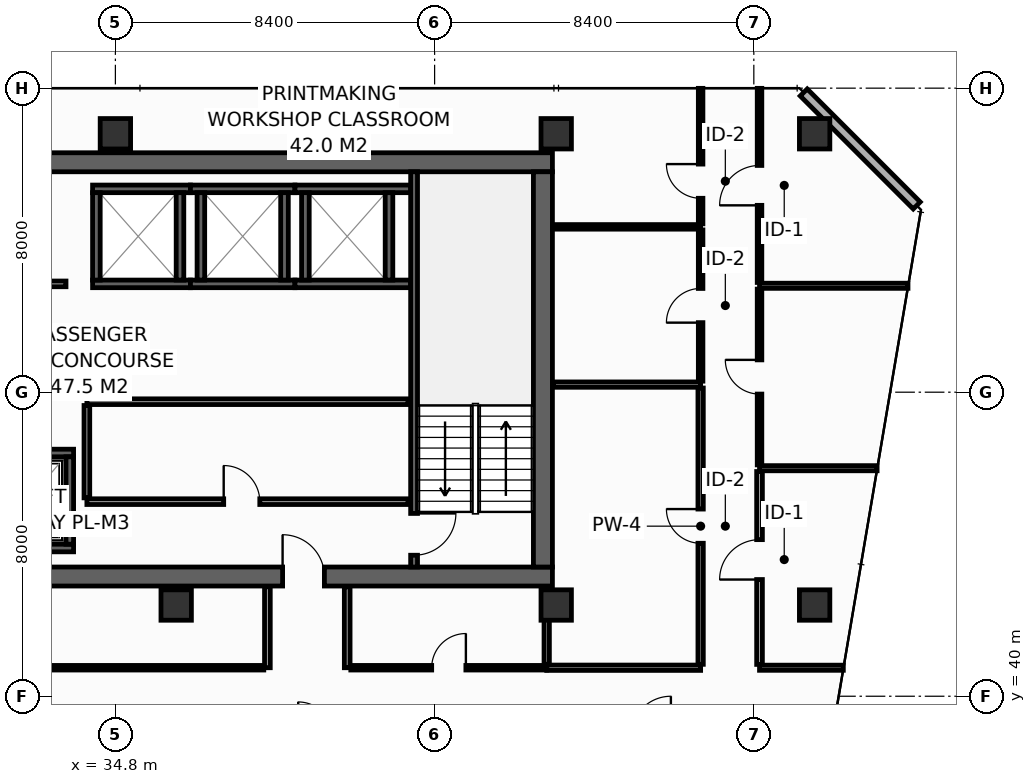
"""IFC4 building model, lengths in metres.
Left out: names, types, materials, properties, quantities, classifications, styles, units other than length and angle.
Written with IfcOpenShell. Run it as: python <this file> out.ifc"""

import sys

from ifc_helpers import new_model, si_unit, direction, frame, frame_2d, origin, origin_2d, place, context, subcontext, project, spatial, rectangle, hollow_rectangle, extrude, element, fill, save


model = new_model("IFC4")
c1 = context("Model", 3, precision=1e-05, world=origin(), true_north=direction((0.0, 1.0)))
c2 = subcontext(c1, "Body", "Model", "MODEL_VIEW")
j1 = project(units=[si_unit("LENGTHUNIT", "METRE"), si_unit("PLANEANGLEUNIT", "RADIAN")], contexts=[c1])
p1 = place(None, origin())
s1 = spatial("IfcSite", under=j1, at=p1, CompositionType="ELEMENT")
p2 = place(p1, origin())
s2 = spatial("IfcBuilding", under=s1, at=p2, CompositionType="ELEMENT")
p3 = place(p2, frame((0.0, 0.0, 213.2)))
s3 = spatial("IfcBuildingStorey", under=s2, at=p3, CompositionType="ELEMENT", Elevation=213.2)
p4 = place(p3, frame((13.6, 43.15, 0.0), z_axis=(0.0, 0.0, 1.0), x_axis=(1.0, 0.0, 0.0)))
e1 = element("IfcWall", 1, at=p4, inside=s3, PredefinedType="SHEAR", context=c2, shape_type="SweptSolid", body=[
    extrude(rectangle(XDim=32.7, YDim=0.5, at=frame_2d((16.35, 0.0))), origin(), (0.0, 0.0, 1.0), 3.55),
])
p5 = place(p4, frame((5.4, 0.0, 0.0)))
e2 = element("IfcOpeningElement", 2, at=p5, cuts=e1, PredefinedType="OPENING", context=c2, shape_type="SweptSolid", body=[
    extrude(rectangle(XDim=1.1, YDim=2.15, at=frame_2d((0.55, 1.075))), frame((0.0, 0.26, 0.0), z_axis=(0.0, -1.0, 0.0), x_axis=(1.0, 0.0, 0.0)), (0.0, 0.0, 1.0), 0.52),
])
p6 = place(p4, frame((25.6, 0.0, 0.0)))
e3 = element("IfcOpeningElement", 3, at=p6, cuts=e1, PredefinedType="OPENING", context=c2, shape_type="SweptSolid", body=[
    extrude(rectangle(XDim=1.1, YDim=2.15, at=frame_2d((0.55, 1.075))), frame((0.0, 0.26, 0.0), z_axis=(0.0, -1.0, 0.0), x_axis=(1.0, 0.0, 0.0)), (0.0, 0.0, 1.0), 0.52),
])
p7 = place(p3, frame((13.6, 54.05, 0.0), z_axis=(0.0, 0.0, 1.0), x_axis=(1.0, 0.0, 0.0)))
e4 = element("IfcWall", 4, at=p7, inside=s3, PredefinedType="SHEAR", context=c2, shape_type="SweptSolid", body=[
    extrude(rectangle(XDim=32.7, YDim=0.5, at=frame_2d((16.35, 0.0))), origin(), (0.0, 0.0, 1.0), 3.55),
])
p8 = place(p3, frame((46.05, 43.4, 0.0), z_axis=(0.0, 0.0, 1.0), x_axis=(0.0, 1.0, 0.0)))
e5 = element("IfcWall", 5, at=p8, inside=s3, PredefinedType="SHEAR", context=c2, shape_type="SweptSolid", body=[
    extrude(rectangle(XDim=10.4, YDim=0.5, at=frame_2d((5.2, 0.0))), origin(), (0.0, 0.0, 1.0), 3.55),
])
for number, where, z_axis, x_axis in (
    (6, (34.8, 54.8, 0.0), (0.0, 0.0, 1.0), (1.0, 0.0, 0.0)),
    (7, (46.4, 54.8, 0.0), (0.0, 0.0, 1.0), (1.0, 0.0, 0.0)),
    (8, (53.2, 54.8, 0.0), (0.0, 0.0, 1.0), (1.0, 0.0, 0.0)),
    (9, (36.4, 42.4, 0.0), (0.0, 0.0, 1.0), (1.0, 0.0, 0.0)),
    (10, (46.4, 42.4, 0.0), (0.0, 0.0, 1.0), (1.0, 0.0, 0.0)),
    (11, (53.2, 42.4, 0.0), (0.0, 0.0, 1.0), (1.0, 0.0, 0.0)),
):
    element("IfcColumn", number, at=place(p3, frame(where, z_axis=z_axis, x_axis=x_axis)), inside=s3, PredefinedType="COLUMN", context=c2, shape_type="SweptSolid", body=[
        extrude(hollow_rectangle(XDim=0.8, YDim=0.8, WallThickness=0.036, at=origin_2d()), origin(), (0.0, 0.0, 1.0), 3.8),
    ])
p9 = place(p3, frame((31.125, 43.9, 0.0), z_axis=(0.0, 0.0, 1.0), x_axis=(1.0, 0.0, 0.0)))
e12 = element("IfcWall", 12, at=p9, inside=s3, PredefinedType="SHEAR", context=c2, shape_type="SweptSolid", body=[
    extrude(rectangle(XDim=2.575, YDim=0.2, at=frame_2d((1.288, 0.0))), origin(), (0.0, 0.0, 1.0), 3.55),
])
p10 = place(p3, frame((31.125, 46.4, 0.0), z_axis=(0.0, 0.0, 1.0), x_axis=(1.0, 0.0, 0.0)))
e13 = element("IfcWall", 13, at=p10, inside=s3, PredefinedType="SHEAR", context=c2, shape_type="SweptSolid", body=[
    extrude(rectangle(XDim=2.575, YDim=0.2, at=frame_2d((1.288, 0.0))), origin(), (0.0, 0.0, 1.0), 3.55),
])
p11 = place(p10, frame((0.825, 0.0, 0.0)))
e14 = element("IfcOpeningElement", 14, at=p11, cuts=e13, PredefinedType="OPENING", context=c2, shape_type="SweptSolid", body=[
    extrude(rectangle(XDim=1.1, YDim=2.2, at=frame_2d((0.55, 1.1))), frame((0.0, 0.11, 0.0), z_axis=(0.0, -1.0, 0.0), x_axis=(1.0, 0.0, 0.0)), (0.0, 0.0, 1.0), 0.22),
])
p12 = place(p3, frame((33.6, 44.0, 0.0), z_axis=(0.0, 0.0, 1.0), x_axis=(0.0, 1.0, 0.0)))
e15 = element("IfcWall", 15, at=p12, inside=s3, PredefinedType="SHEAR", context=c2, shape_type="SweptSolid", body=[
    extrude(rectangle(XDim=2.3, YDim=0.2, at=frame_2d((1.15, 0.0))), origin(), (0.0, 0.0, 1.0), 3.55),
])
for number, where, z_axis, x_axis in (
    (16, (34.2, 50.85, 0.0), (0.0, 0.0, 1.0), (1.0, 0.0, 0.0)),
    (17, (34.2, 53.35, 0.0), (0.0, 0.0, 1.0), (1.0, 0.0, 0.0)),
):
    element("IfcWall", number, at=place(p3, frame(where, z_axis=z_axis, x_axis=x_axis)), inside=s3, PredefinedType="SHEAR", context=c2, shape_type="SweptSolid", body=[
        extrude(rectangle(XDim=2.575, YDim=0.2, at=frame_2d((1.288, 0.0))), origin(), (0.0, 0.0, 1.0), 3.55),
    ])
for number, where, z_axis, x_axis in (
    (18, (34.3, 50.95, 0.0), (0.0, 0.0, 1.0), (0.0, 1.0, 0.0)),
    (19, (36.5, 50.95, 0.0), (0.0, 0.0, 1.0), (0.0, 1.0, 0.0)),
):
    element("IfcWall", number, at=place(p3, frame(where, z_axis=z_axis, x_axis=x_axis)), inside=s3, PredefinedType="SHEAR", context=c2, shape_type="SweptSolid", body=[
        extrude(rectangle(XDim=2.3, YDim=0.2, at=frame_2d((1.15, 0.0))), origin(), (0.0, 0.0, 1.0), 3.55),
    ])
for number, where, z_axis, x_axis in (
    (20, (36.775, 50.85, 0.0), (0.0, 0.0, 1.0), (1.0, 0.0, 0.0)),
    (21, (36.775, 53.35, 0.0), (0.0, 0.0, 1.0), (1.0, 0.0, 0.0)),
):
    element("IfcWall", number, at=place(p3, frame(where, z_axis=z_axis, x_axis=x_axis)), inside=s3, PredefinedType="SHEAR", context=c2, shape_type="SweptSolid", body=[
        extrude(rectangle(XDim=2.75, YDim=0.2, at=frame_2d((1.375, 0.0))), origin(), (0.0, 0.0, 1.0), 3.55),
    ])
for number, where, z_axis, x_axis in (
    (22, (37.05, 50.95, 0.0), (0.0, 0.0, 1.0), (0.0, 1.0, 0.0)),
    (23, (39.25, 50.95, 0.0), (0.0, 0.0, 1.0), (0.0, 1.0, 0.0)),
):
    element("IfcWall", number, at=place(p3, frame(where, z_axis=z_axis, x_axis=x_axis)), inside=s3, PredefinedType="SHEAR", context=c2, shape_type="SweptSolid", body=[
        extrude(rectangle(XDim=2.3, YDim=0.2, at=frame_2d((1.15, 0.0))), origin(), (0.0, 0.0, 1.0), 3.55),
    ])
for number, where, z_axis, x_axis in (
    (24, (39.525, 50.85, 0.0), (0.0, 0.0, 1.0), (1.0, 0.0, 0.0)),
    (25, (39.525, 53.35, 0.0), (0.0, 0.0, 1.0), (1.0, 0.0, 0.0)),
):
    element("IfcWall", number, at=place(p3, frame(where, z_axis=z_axis, x_axis=x_axis)), inside=s3, PredefinedType="SHEAR", context=c2, shape_type="SweptSolid", body=[
        extrude(rectangle(XDim=3.045, YDim=0.2, at=frame_2d((1.522, 0.0))), origin(), (0.0, 0.0, 1.0), 3.55),
    ])
for number, where, z_axis, x_axis in (
    (26, (39.8, 50.95, 0.0), (0.0, 0.0, 1.0), (0.0, 1.0, 0.0)),
    (27, (42.0, 50.95, 0.0), (0.0, 0.0, 1.0), (0.0, 1.0, 0.0)),
):
    element("IfcWall", number, at=place(p3, frame(where, z_axis=z_axis, x_axis=x_axis)), inside=s3, PredefinedType="SHEAR", context=c2, shape_type="SweptSolid", body=[
        extrude(rectangle(XDim=2.3, YDim=0.2, at=frame_2d((1.15, 0.0))), origin(), (0.0, 0.0, 1.0), 3.55),
    ])
p13 = place(p3, frame((42.66, 53.8, 0.0), z_axis=(0.0, 0.0, 1.0), x_axis=(0.0, -1.0, 0.0)))
e28 = element("IfcWall", 28, at=p13, inside=s3, PredefinedType="SHEAR", context=c2, shape_type="SweptSolid", body=[
    extrude(rectangle(XDim=10.4, YDim=0.18, at=frame_2d((5.2, 0.0))), origin(), (0.0, 0.0, 1.0), 3.55),
])
p14 = place(p13, frame((8.99, 0.0, 0.0)))
e29 = element("IfcOpeningElement", 29, at=p14, cuts=e28, PredefinedType="OPENING", context=c2, shape_type="SweptSolid", body=[
    extrude(rectangle(XDim=1.1, YDim=2.15, at=frame_2d((0.55, 1.075))), frame((0.0, 0.1, 0.0), z_axis=(0.0, -1.0, 0.0), x_axis=(1.0, 0.0, 0.0)), (0.0, 0.0, 1.0), 0.2),
])
p15 = place(p3, frame((34.05, 45.12, 0.0), z_axis=(0.0, 0.0, 1.0), x_axis=(1.0, 0.0, 0.0)))
e30 = element("IfcWall", 30, at=p15, inside=s3, PredefinedType="PARTITIONING", context=c2, shape_type="SweptSolid", body=[
    extrude(rectangle(XDim=8.45, YDim=0.15, at=frame_2d((4.225, 0.0))), origin(), (0.0, 0.0, 1.0), 3.55),
])
p16 = place(p15, frame((3.6, 0.0, 0.0)))
e31 = element("IfcOpeningElement", 31, at=p16, cuts=e30, PredefinedType="OPENING", context=c2, shape_type="SweptSolid", body=[
    extrude(rectangle(XDim=0.95, YDim=2.15, at=frame_2d((0.475, 1.075))), frame((0.0, 0.085, 0.0), z_axis=(0.0, -1.0, 0.0), x_axis=(1.0, 0.0, 0.0)), (0.0, 0.0, 1.0), 0.17),
])
p17 = place(p3, frame((34.05, 47.75, 0.0), z_axis=(0.0, 0.0, 1.0), x_axis=(1.0, 0.0, 0.0)))
e32 = element("IfcWall", 32, at=p17, inside=s3, PredefinedType="PARTITIONING", context=c2, shape_type="SweptSolid", body=[
    extrude(rectangle(XDim=8.45, YDim=0.15, at=frame_2d((4.225, 0.0))), origin(), (0.0, 0.0, 1.0), 3.55),
])
p18 = place(p3, frame((34.05, 45.22, 0.0), z_axis=(0.0, 0.0, 1.0), x_axis=(0.0, 1.0, 0.0)))
e33 = element("IfcWall", 33, at=p18, inside=s3, PredefinedType="PARTITIONING", context=c2, shape_type="SweptSolid", body=[
    extrude(rectangle(XDim=2.43, YDim=0.15, at=frame_2d((1.215, 0.0))), origin(), (0.0, 0.0, 1.0), 3.55),
])
p19 = place(p3, frame((25.85, 50.85, 0.0), z_axis=(0.0, 0.0, 1.0), x_axis=(1.0, 0.0, 0.0)))
e34 = element("IfcWall", 34, at=p19, inside=s3, PredefinedType="PARTITIONING", context=c2, shape_type="SweptSolid", body=[
    extrude(rectangle(XDim=7.65, YDim=0.15, at=frame_2d((3.825, 0.0))), origin(), (0.0, 0.0, 1.0), 3.55),
])
p20 = place(p19, frame((1.25, 0.0, 0.0)))
e35 = element("IfcOpeningElement", 35, at=p20, cuts=e34, PredefinedType="OPENING", context=c2, shape_type="SweptSolid", body=[
    extrude(rectangle(XDim=0.95, YDim=2.15, at=frame_2d((0.475, 1.075))), frame((0.0, 0.085, 0.0), z_axis=(0.0, -1.0, 0.0), x_axis=(1.0, 0.0, 0.0)), (0.0, 0.0, 1.0), 0.17),
])
p21 = place(p19, frame((5.05, 0.0, 0.0)))
e36 = element("IfcOpeningElement", 36, at=p21, cuts=e34, PredefinedType="OPENING", context=c2, shape_type="SweptSolid", body=[
    extrude(rectangle(XDim=0.95, YDim=2.15, at=frame_2d((0.475, 1.075))), frame((0.0, 0.085, 0.0), z_axis=(0.0, -1.0, 0.0), x_axis=(1.0, 0.0, 0.0)), (0.0, 0.0, 1.0), 0.17),
])
p22 = place(p3, frame((55.887, 52.913, 0.0), z_axis=(0.0, 0.0, 1.0), x_axis=(-0.707106781187, 0.707106781187, 0.0)))
e37 = element("IfcWall", 37, at=p22, inside=s3, PredefinedType="STANDARD", context=c2, shape_type="SweptSolid", body=[
    extrude(rectangle(XDim=4.206, YDim=0.26, at=frame_2d((2.103, 0.0))), origin(), (0.0, 0.0, 1.0), 3.55),
])
p23 = place(p3, frame((46.15, 40.75, 0.0), z_axis=(0.0, 0.0, 1.0), x_axis=(1.0, 0.0, 0.0)))
e38 = element("IfcWall", 38, at=p23, inside=s3, PredefinedType="PARTITIONING", context=c2, shape_type="SweptSolid", body=[
    extrude(rectangle(XDim=4.05, YDim=0.14, at=frame_2d((2.025, 0.0))), origin(), (0.0, 0.0, 1.0), 3.55),
])
p24 = place(p3, frame((46.15, 40.84, 0.0), z_axis=(0.0, 0.0, 1.0), x_axis=(0.0, 1.0, 0.0)))
e39 = element("IfcWall", 39, at=p24, inside=s3, PredefinedType="PARTITIONING", context=c2, shape_type="SweptSolid", body=[
    extrude(rectangle(XDim=2.04, YDim=0.14, at=frame_2d((1.02, 0.0))), origin(), (0.0, 0.0, 1.0), 3.55),
])
p25 = place(p3, frame((46.32, 48.2, 0.0), z_axis=(0.0, 0.0, 1.0), x_axis=(1.0, 0.0, 0.0)))
e40 = element("IfcWall", 40, at=p25, inside=s3, PredefinedType="PARTITIONING", context=c2, shape_type="SweptSolid", body=[
    extrude(rectangle(XDim=3.88, YDim=0.14, at=frame_2d((1.94, 0.0))), origin(), (0.0, 0.0, 1.0), 3.55),
])
p26 = place(p3, frame((50.2, 40.84, 0.0), z_axis=(0.0, 0.0, 1.0), x_axis=(0.0, 1.0, 0.0)))
e41 = element("IfcWall", 41, at=p26, inside=s3, PredefinedType="PARTITIONING", context=c2, shape_type="SweptSolid", body=[
    extrude(rectangle(XDim=7.27, YDim=0.14, at=frame_2d((3.635, 0.0))), origin(), (0.0, 0.0, 1.0), 2.835),
])
p27 = place(p26, frame((3.185, 0.0, 0.0)))
e42 = element("IfcOpeningElement", 42, at=p27, cuts=e41, PredefinedType="OPENING", context=c2, shape_type="SweptSolid", body=[
    extrude(rectangle(XDim=0.9, YDim=2.1, at=frame_2d((0.45, 1.05))), frame((0.0, 0.08, 0.0), z_axis=(0.0, -1.0, 0.0), x_axis=(1.0, 0.0, 0.0)), (0.0, 0.0, 1.0), 0.16),
])
p28 = place(p3, frame((46.32, 52.35, 0.0), z_axis=(0.0, 0.0, 1.0), x_axis=(1.0, 0.0, 0.0)))
e43 = element("IfcWall", 43, at=p28, inside=s3, PredefinedType="PARTITIONING", context=c2, shape_type="SweptSolid", body=[
    extrude(rectangle(XDim=3.88, YDim=0.12, at=frame_2d((1.94, 0.0))), origin(), (0.0, 0.0, 1.0), 3.55),
])
p29 = place(p3, frame((50.2, 48.29, 0.0), z_axis=(0.0, 0.0, 1.0), x_axis=(0.0, 1.0, 0.0)))
e44 = element("IfcWall", 44, at=p29, inside=s3, PredefinedType="PARTITIONING", context=c2, shape_type="SweptSolid", body=[
    extrude(rectangle(XDim=3.98, YDim=0.12, at=frame_2d((1.99, 0.0))), origin(), (0.0, 0.0, 1.0), 3.55),
])
p30 = place(p29, frame((1.54, 0.0, 0.0)))
e45 = element("IfcOpeningElement", 45, at=p30, cuts=e44, PredefinedType="OPENING", context=c2, shape_type="SweptSolid", body=[
    extrude(rectangle(XDim=0.9, YDim=2.1, at=frame_2d((0.45, 1.05))), frame((0.0, 0.07, 0.0), z_axis=(0.0, -1.0, 0.0), x_axis=(1.0, 0.0, 0.0)), (0.0, 0.0, 1.0), 0.14),
])
p31 = place(p3, frame((50.2, 52.43, 0.0), z_axis=(0.0, 0.0, 1.0), x_axis=(0.0, 1.0, 0.0)))
e46 = element("IfcWall", 46, at=p31, inside=s3, PredefinedType="PARTITIONING", context=c2, shape_type="SweptSolid", body=[
    extrude(rectangle(XDim=3.565, YDim=0.12, at=frame_2d((1.783, 0.0))), origin(), (0.0, 0.0, 1.0), 2.935),
])
p32 = place(p31, frame((0.672, 0.0, 0.0)))
e47 = element("IfcOpeningElement", 47, at=p32, cuts=e46, PredefinedType="OPENING", context=c2, shape_type="SweptSolid", body=[
    extrude(rectangle(XDim=0.9, YDim=2.1, at=frame_2d((0.45, 1.05))), frame((0.0, 0.07, 0.0), z_axis=(0.0, -1.0, 0.0), x_axis=(1.0, 0.0, 0.0)), (0.0, 0.0, 1.0), 0.14),
])
p33 = place(p3, frame((51.75, 40.75, 0.0), z_axis=(0.0, 0.0, 1.0), x_axis=(1.0, 0.0, 0.0)))
e48 = element("IfcWall", 48, at=p33, inside=s3, PredefinedType="PARTITIONING", context=c2, shape_type="SweptSolid", body=[
    extrude(rectangle(XDim=2.205, YDim=0.135, at=frame_2d((1.103, 0.0))), origin(), (0.0, 0.0, 1.0), 3.035),
])
p34 = place(p3, frame((51.75, 46.0, 0.0), z_axis=(0.0, 0.0, 1.0), x_axis=(1.0, 0.0, 0.0)))
e49 = element("IfcWall", 49, at=p34, inside=s3, PredefinedType="PARTITIONING", context=c2, shape_type="SweptSolid", body=[
    extrude(rectangle(XDim=3.094, YDim=0.135, at=frame_2d((1.547, 0.0))), origin(), (0.0, 0.0, 1.0), 2.835),
])
p35 = place(p3, frame((51.75, 50.8, 0.0), z_axis=(0.0, 0.0, 1.0), x_axis=(1.0, 0.0, 0.0)))
e50 = element("IfcWall", 50, at=p35, inside=s3, PredefinedType="PARTITIONING", context=c2, shape_type="SweptSolid", body=[
    extrude(rectangle(XDim=3.906, YDim=0.135, at=frame_2d((1.953, 0.0))), origin(), (0.0, 0.0, 1.0), 2.835),
])
p36 = place(p3, frame((51.75, 40.837, 0.0), z_axis=(0.0, 0.0, 1.0), x_axis=(0.0, 1.0, 0.0)))
e51 = element("IfcWall", 51, at=p36, inside=s3, PredefinedType="PARTITIONING", context=c2, shape_type="SweptSolid", body=[
    extrude(rectangle(XDim=5.075, YDim=0.15, at=frame_2d((2.538, 0.0))), origin(), (0.0, 0.0, 1.0), 2.835),
])
p37 = place(p36, frame((2.233, 0.0, 0.0)))
e52 = element("IfcOpeningElement", 52, at=p37, cuts=e51, PredefinedType="OPENING", context=c2, shape_type="SweptSolid", body=[
    extrude(rectangle(XDim=1.05, YDim=2.15, at=frame_2d((0.525, 1.075))), frame((0.0, 0.085, 0.0), z_axis=(0.0, -1.0, 0.0), x_axis=(1.0, 0.0, 0.0)), (0.0, 0.0, 1.0), 0.17),
])
p38 = place(p3, frame((51.75, 46.087, 0.0), z_axis=(0.0, 0.0, 1.0), x_axis=(0.0, 1.0, 0.0)))
e53 = element("IfcWall", 53, at=p38, inside=s3, PredefinedType="PARTITIONING", context=c2, shape_type="SweptSolid", body=[
    extrude(rectangle(XDim=4.625, YDim=0.12, at=frame_2d((2.312, 0.0))), origin(), (0.0, 0.0, 1.0), 3.55),
])
p39 = place(p38, frame((1.863, 0.0, 0.0)))
e54 = element("IfcOpeningElement", 54, at=p39, cuts=e53, PredefinedType="OPENING", context=c2, shape_type="SweptSolid", body=[
    extrude(rectangle(XDim=0.9, YDim=2.1, at=frame_2d((0.45, 1.05))), frame((0.0, 0.07, 0.0), z_axis=(0.0, -1.0, 0.0), x_axis=(1.0, 0.0, 0.0)), (0.0, 0.0, 1.0), 0.14),
])
p40 = place(p3, frame((51.75, 50.887, 0.0), z_axis=(0.0, 0.0, 1.0), x_axis=(0.0, 1.0, 0.0)))
e55 = element("IfcWall", 55, at=p40, inside=s3, PredefinedType="PARTITIONING", context=c2, shape_type="SweptSolid", body=[
    extrude(rectangle(XDim=5.108, YDim=0.12, at=frame_2d((2.554, 0.0))), origin(), (0.0, 0.0, 1.0), 2.935),
])
p41 = place(p40, frame((2.029, 0.0, 0.0)))
e56 = element("IfcOpeningElement", 56, at=p41, cuts=e55, PredefinedType="OPENING", context=c2, shape_type="SweptSolid", body=[
    extrude(rectangle(XDim=1.05, YDim=2.15, at=frame_2d((0.525, 1.075))), frame((0.0, 0.07, 0.0), z_axis=(0.0, -1.0, 0.0), x_axis=(1.0, 0.0, 0.0)), (0.0, 0.0, 1.0), 0.14),
])
for number, where, z_axis, x_axis in (
    (57, (38.8, 40.75, 0.0), (0.0, 0.0, 1.0), (0.0, 1.0, 0.0)),
    (58, (40.9, 40.75, 0.0), (0.0, 0.0, 1.0), (0.0, 1.0, 0.0)),
):
    element("IfcWall", number, at=place(p3, frame(where, z_axis=z_axis, x_axis=x_axis)), inside=s3, PredefinedType="PARTITIONING", context=c2, shape_type="SweptSolid", body=[
        extrude(rectangle(XDim=2.13, YDim=0.15, at=frame_2d((1.065, 0.0))), origin(), (0.0, 0.0, 1.0), 3.55),
    ])
p42 = place(p3, frame((20.795, 40.75, 0.0), z_axis=(0.0, 0.0, 1.0), x_axis=(1.0, 0.0, 0.0)))
e59 = element("IfcWall", 59, at=p42, inside=s3, PredefinedType="PARTITIONING", context=c2, shape_type="SweptSolid", body=[
    extrude(rectangle(XDim=17.91, YDim=0.12, at=frame_2d((8.955, 0.0))), origin(), (0.0, 0.0, 1.0), 2.835),
])
p43 = place(p42, frame((8.505, 0.0, 0.0)))
e60 = element("IfcOpeningElement", 60, at=p43, cuts=e59, PredefinedType="OPENING", context=c2, shape_type="SweptSolid", body=[
    extrude(rectangle(XDim=0.9, YDim=2.1, at=frame_2d((0.45, 1.05))), frame((0.0, 0.07, 0.0), z_axis=(0.0, -1.0, 0.0), x_axis=(1.0, 0.0, 0.0)), (0.0, 0.0, 1.0), 0.14),
])
p44 = place(p3, frame((40.995, 40.75, 0.0), z_axis=(0.0, 0.0, 1.0), x_axis=(1.0, 0.0, 0.0)))
e61 = element("IfcWall", 61, at=p44, inside=s3, PredefinedType="PARTITIONING", context=c2, shape_type="SweptSolid", body=[
    extrude(rectangle(XDim=5.155, YDim=0.12, at=frame_2d((2.577, 0.0))), origin(), (0.0, 0.0, 1.0), 3.55),
])
p45 = place(p44, frame((2.128, 0.0, 0.0)))
e62 = element("IfcOpeningElement", 62, at=p45, cuts=e61, PredefinedType="OPENING", context=c2, shape_type="SweptSolid", body=[
    extrude(rectangle(XDim=0.9, YDim=2.1, at=frame_2d((0.45, 1.05))), frame((0.0, 0.07, 0.0), z_axis=(0.0, -1.0, 0.0), x_axis=(1.0, 0.0, 0.0)), (0.0, 0.0, 1.0), 0.14),
])
p46 = place(p14, origin())
e63 = element("IfcDoor", 63, at=p46, inside=s3, OperationType="SINGLE_SWING_LEFT", PredefinedType="DOOR", context=c2, shape_type="SweptSolid", body=[
    extrude(rectangle(XDim=1.1, YDim=2.15, at=frame_2d((0.55, 1.075))), frame((0.0, 0.025, 0.0), z_axis=(0.0, -1.0, 0.0), x_axis=(1.0, 0.0, 0.0)), (0.0, 0.0, 1.0), 0.05),
])
fill(e29, e63)
p47 = place(p6, origin())
e64 = element("IfcDoor", 64, at=p47, inside=s3, OperationType="SINGLE_SWING_LEFT", PredefinedType="DOOR", context=c2, shape_type="SweptSolid", body=[
    extrude(rectangle(XDim=1.1, YDim=2.15, at=frame_2d((0.55, 1.075))), frame((0.0, 0.025, 0.0), z_axis=(0.0, -1.0, 0.0), x_axis=(1.0, 0.0, 0.0)), (0.0, 0.0, 1.0), 0.05),
])
fill(e3, e64)
p48 = place(p16, origin())
e65 = element("IfcDoor", 65, at=p48, inside=s3, OperationType="SINGLE_SWING_LEFT", PredefinedType="DOOR", context=c2, shape_type="SweptSolid", body=[
    extrude(rectangle(XDim=0.95, YDim=2.15, at=frame_2d((0.475, 1.075))), frame((0.0, 0.025, 0.0), z_axis=(0.0, -1.0, 0.0), x_axis=(1.0, 0.0, 0.0)), (0.0, 0.0, 1.0), 0.05),
])
fill(e31, e65)
p49 = place(p27, origin())
e66 = element("IfcDoor", 66, at=p49, inside=s3, OperationType="SINGLE_SWING_RIGHT", PredefinedType="DOOR", context=c2, shape_type="SweptSolid", body=[
    extrude(rectangle(XDim=0.9, YDim=2.1, at=frame_2d((0.45, 1.05))), frame((0.0, 0.025, 0.0), z_axis=(0.0, -1.0, 0.0), x_axis=(1.0, 0.0, 0.0)), (0.0, 0.0, 1.0), 0.05),
])
fill(e42, e66)
p50 = place(p30, origin())
e67 = element("IfcDoor", 67, at=p50, inside=s3, OperationType="SINGLE_SWING_LEFT", PredefinedType="DOOR", context=c2, shape_type="SweptSolid", body=[
    extrude(rectangle(XDim=0.9, YDim=2.1, at=frame_2d((0.45, 1.05))), frame((0.0, 0.025, 0.0), z_axis=(0.0, -1.0, 0.0), x_axis=(1.0, 0.0, 0.0)), (0.0, 0.0, 1.0), 0.05),
])
fill(e45, e67)
p51 = place(p32, origin())
e68 = element("IfcDoor", 68, at=p51, inside=s3, OperationType="SINGLE_SWING_RIGHT", PredefinedType="DOOR", context=c2, shape_type="SweptSolid", body=[
    extrude(rectangle(XDim=0.9, YDim=2.1, at=frame_2d((0.45, 1.05))), frame((0.0, 0.025, 0.0), z_axis=(0.0, -1.0, 0.0), x_axis=(1.0, 0.0, 0.0)), (0.0, 0.0, 1.0), 0.05),
])
fill(e47, e68)
p52 = place(p37, origin())
e69 = element("IfcDoor", 69, at=p52, inside=s3, OperationType="SINGLE_SWING_LEFT", PredefinedType="DOOR", context=c2, shape_type="SweptSolid", body=[
    extrude(rectangle(XDim=1.05, YDim=2.15, at=frame_2d((0.525, 1.075))), frame((0.0, 0.025, 0.0), z_axis=(0.0, -1.0, 0.0), x_axis=(1.0, 0.0, 0.0)), (0.0, 0.0, 1.0), 0.05),
])
fill(e52, e69)
p53 = place(p39, origin())
e70 = element("IfcDoor", 70, at=p53, inside=s3, OperationType="SINGLE_SWING_RIGHT", PredefinedType="DOOR", context=c2, shape_type="SweptSolid", body=[
    extrude(rectangle(XDim=0.9, YDim=2.1, at=frame_2d((0.45, 1.05))), frame((0.0, 0.025, 0.0), z_axis=(0.0, -1.0, 0.0), x_axis=(1.0, 0.0, 0.0)), (0.0, 0.0, 1.0), 0.05),
])
fill(e54, e70)
p54 = place(p41, origin())
e71 = element("IfcDoor", 71, at=p54, inside=s3, OperationType="SINGLE_SWING_LEFT", PredefinedType="DOOR", context=c2, shape_type="SweptSolid", body=[
    extrude(rectangle(XDim=1.05, YDim=2.15, at=frame_2d((0.525, 1.075))), frame((0.0, 0.025, 0.0), z_axis=(0.0, -1.0, 0.0), x_axis=(1.0, 0.0, 0.0)), (0.0, 0.0, 1.0), 0.05),
])
fill(e56, e71)
p55 = place(p45, origin())
e72 = element("IfcDoor", 72, at=p55, inside=s3, OperationType="SINGLE_SWING_RIGHT", PredefinedType="DOOR", context=c2, shape_type="SweptSolid", body=[
    extrude(rectangle(XDim=0.9, YDim=2.1, at=frame_2d((0.45, 1.05))), frame((0.0, 0.025, 0.0), z_axis=(0.0, -1.0, 0.0), x_axis=(1.0, 0.0, 0.0)), (0.0, 0.0, 1.0), 0.05),
])
fill(e62, e72)
save(model, sys.argv[1])
